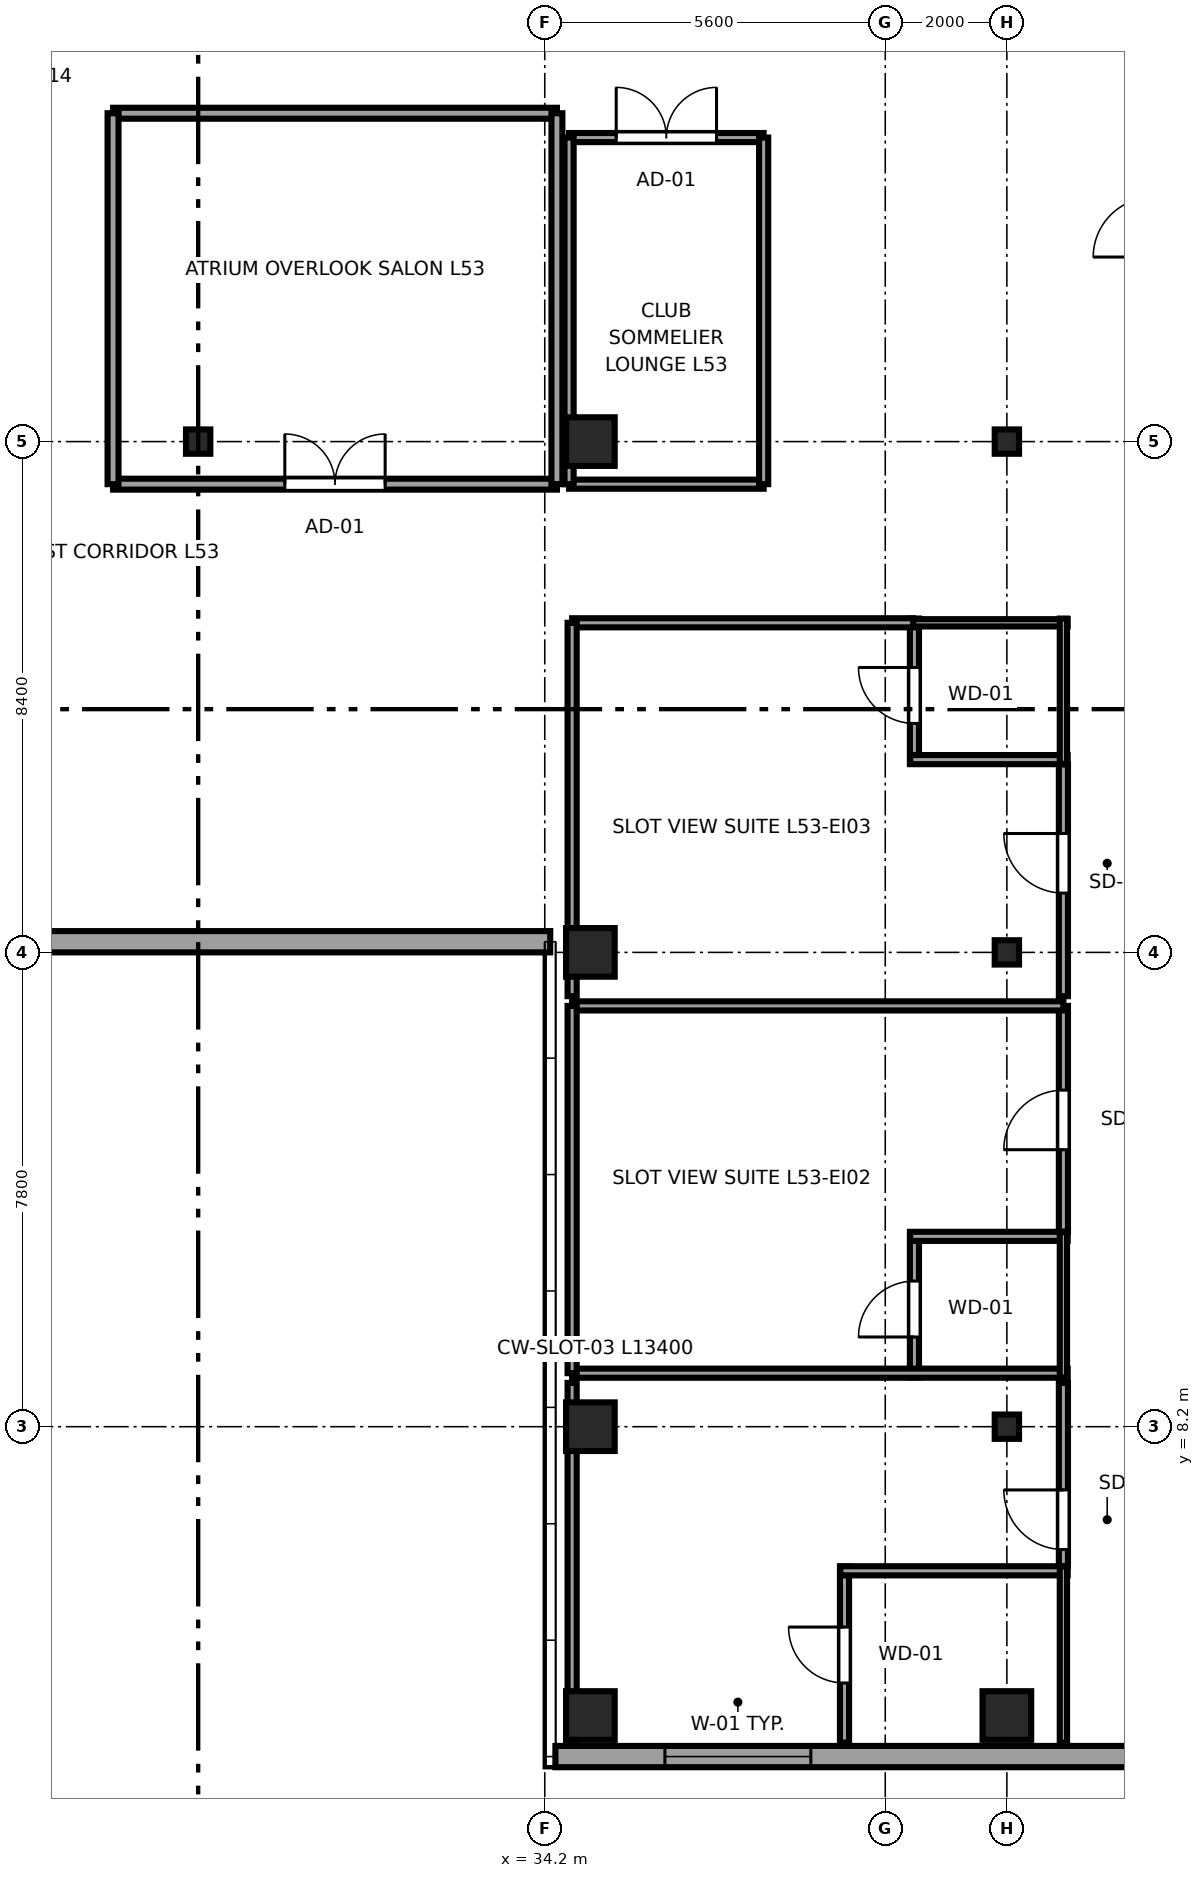
"""IFC4 building model, lengths in metres.
Left out: names, types, materials, properties, quantities, classifications, styles, units other than length and angle.
Written with IfcOpenShell. Run it as: python <this file> out.ifc"""

import sys

from ifc_helpers import new_model, si_unit, direction, frame, frame_2d, origin, origin_2d, place, context, subcontext, project, spatial, rectangle, i_section, extrude, source, transform, mapped, element, fill, save


model = new_model("IFC4")
c1 = context("Model", 3, precision=1e-05, world=origin(), true_north=direction((0.0, 1.0)))
c2 = subcontext(c1, "Body", "Model", "MODEL_VIEW")
j1 = project(units=[si_unit("LENGTHUNIT", "METRE"), si_unit("PLANEANGLEUNIT", "RADIAN")], contexts=[c1])
p1 = place(None, origin())
s1 = spatial("IfcSite", under=j1, at=p1, CompositionType="ELEMENT")
p2 = place(p1, origin())
s2 = spatial("IfcBuilding", under=s1, at=p2, CompositionType="ELEMENT")
p3 = place(p2, frame((0.0, 0.0, 201.75)))
s3 = spatial("IfcBuildingStorey", under=s2, at=p3, CompositionType="ELEMENT", Elevation=201.75)
m1 = source(origin(), c2, "Body", "SweptSolid", [
    extrude(rectangle(XDim=0.8, YDim=0.8, at=origin_2d()), origin(), (0.0, 0.0, 1.0), 3.55),
])
for number, where, z_axis, x_axis in (
    (1, (34.95, 3.45, 0.0), (0.0, 0.0, 1.0), (1.0, 0.0, 0.0)),
    (2, (34.95, 8.2, 0.0), (0.0, 0.0, 1.0), (1.0, 0.0, 0.0)),
    (3, (34.95, 16.0, 0.0), (0.0, 0.0, 1.0), (1.0, 0.0, 0.0)),
    (4, (34.95, 24.4, 0.0), (0.0, 0.0, 1.0), (1.0, 0.0, 0.0)),
    (5, (41.8, 3.45, 0.0), (0.0, 0.0, 1.0), (1.0, 0.0, 0.0)),
):
    element("IfcColumn", number, at=place(p3, frame(where, z_axis=z_axis, x_axis=x_axis)), inside=s3, PredefinedType="COLUMN", context=c2, shape_type="MappedRepresentation", body=[
        mapped(m1, transform((0.0, 0.0, 0.0), x_axis=(1.0, 0.0, 0.0), y_axis=(0.0, 1.0, 0.0), z_axis=(0.0, 0.0, 1.0), scale=1.0)),
    ])
m2 = source(origin(), c2, "Body", "SweptSolid", [
    extrude(i_section(OverallWidth=0.4, OverallDepth=0.4, WebThickness=0.02, FlangeThickness=0.035, at=origin_2d()), origin(), (0.0, 0.0, 1.0), 3.55),
])
for number, where, z_axis, x_axis in (
    (6, (41.8, 8.2, 0.0), (0.0, 0.0, 1.0), (1.0, 0.0, 0.0)),
    (7, (41.8, 16.0, 0.0), (0.0, 0.0, 1.0), (1.0, 0.0, 0.0)),
    (8, (41.8, 24.4, 0.0), (0.0, 0.0, 1.0), (1.0, 0.0, 0.0)),
    (9, (28.5, 24.4, 0.0), (0.0, 0.0, 1.0), (1.0, 0.0, 0.0)),
):
    element("IfcColumn", number, at=place(p3, frame(where, z_axis=z_axis, x_axis=x_axis)), inside=s3, PredefinedType="COLUMN", context=c2, shape_type="MappedRepresentation", body=[
        mapped(m2, transform((0.0, 0.0, 0.0), x_axis=(1.0, 0.0, 0.0), y_axis=(0.0, 1.0, 0.0), z_axis=(0.0, 0.0, 1.0), scale=1.0)),
    ])
p4 = place(p3, frame((22.71, 16.175, 0.0), z_axis=(0.0, 0.0, 1.0), x_axis=(1.0, 0.0, 0.0)))
e10 = element("IfcWall", 10, at=p4, inside=s3, PredefinedType="SOLIDWALL", context=c2, shape_type="SweptSolid", body=[
    extrude(rectangle(XDim=11.58, YDim=0.35, at=frame_2d((5.79, 0.0))), origin(), (0.0, 0.0, 1.0), 2.08),
])
p5 = place(p3, frame((34.375, 2.775, 0.0), z_axis=(0.0, 0.0, 1.0), x_axis=(1.0, 0.0, 0.0)))
e11 = element("IfcWall", 11, at=p5, inside=s3, PredefinedType="SOLIDWALL", context=c2, shape_type="SweptSolid", body=[
    extrude(rectangle(XDim=15.608, YDim=0.35, at=frame_2d((7.804, 0.0))), origin(), (0.0, 0.0, 1.0), 3.29),
])
p6 = place(p5, frame((1.801, 0.0, 0.68)))
e12 = element("IfcOpeningElement", 12, at=p6, cuts=e11, PredefinedType="OPENING", context=c2, shape_type="SweptSolid", body=[
    extrude(rectangle(XDim=2.4, YDim=1.9, at=frame_2d((1.2, 0.95))), frame((0.0, 0.185, 0.0), z_axis=(0.0, -1.0, 0.0), x_axis=(1.0, 0.0, 0.0)), (0.0, 0.0, 1.0), 0.37),
])
p7 = place(p5, frame((11.406, 0.0, 0.68)))
e13 = element("IfcOpeningElement", 13, at=p7, cuts=e11, PredefinedType="OPENING", context=c2, shape_type="SweptSolid", body=[
    extrude(rectangle(XDim=2.4, YDim=1.9, at=frame_2d((1.2, 0.95))), frame((0.0, 0.185, 0.0), z_axis=(0.0, -1.0, 0.0), x_axis=(1.0, 0.0, 0.0)), (0.0, 0.0, 1.0), 0.37),
])
p8 = place(p3, frame((39.13, 3.005, 0.0), z_axis=(0.0, 0.0, 1.0), x_axis=(0.0, 1.0, 0.0)))
e14 = element("IfcWall", 14, at=p8, inside=s3, PredefinedType="PARTITIONING", context=c2, shape_type="SweptSolid", body=[
    extrude(rectangle(XDim=2.895, YDim=0.15, at=frame_2d((1.448, 0.0))), origin(), (0.0, 0.0, 1.0), 3.29),
])
p9 = place(p8, frame((0.98, 0.0, 0.0)))
e15 = element("IfcOpeningElement", 15, at=p9, cuts=e14, PredefinedType="OPENING", context=c2, shape_type="SweptSolid", body=[
    extrude(rectangle(XDim=0.92, YDim=2.01, at=frame_2d((0.46, 1.005))), frame((0.0, 0.085, 0.0), z_axis=(0.0, -1.0, 0.0), x_axis=(1.0, 0.0, 0.0)), (0.0, 0.0, 1.0), 0.17),
])
p10 = place(p3, frame((39.06, 5.83, 0.0), z_axis=(0.0, 0.0, 1.0), x_axis=(1.0, 0.0, 0.0)))
e16 = element("IfcWall", 16, at=p10, inside=s3, PredefinedType="PARTITIONING", context=c2, shape_type="SweptSolid", body=[
    extrude(rectangle(XDim=3.74, YDim=0.15, at=frame_2d((1.87, 0.0))), origin(), (0.0, 0.0, 1.0), 3.29),
])
p11 = place(p3, frame((42.73, 3.005, 0.0), z_axis=(0.0, 0.0, 1.0), x_axis=(0.0, 1.0, 0.0)))
e17 = element("IfcWall", 17, at=p11, inside=s3, PredefinedType="PLUMBINGWALL", context=c2, shape_type="SweptSolid", body=[
    extrude(rectangle(XDim=2.895, YDim=0.12, at=frame_2d((1.448, 0.0))), origin(), (0.0, 0.0, 1.0), 3.29),
])
p12 = place(p3, frame((40.28, 9.01, 0.0), z_axis=(0.0, 0.0, 1.0), x_axis=(0.0, 1.0, 0.0)))
e18 = element("IfcWall", 18, at=p12, inside=s3, PredefinedType="PARTITIONING", context=c2, shape_type="SweptSolid", body=[
    extrude(rectangle(XDim=2.39, YDim=0.15, at=frame_2d((1.195, 0.0))), origin(), (0.0, 0.0, 1.0), 3.29),
])
p13 = place(p12, frame((0.665, 0.0, 0.0)))
e19 = element("IfcOpeningElement", 19, at=p13, cuts=e18, PredefinedType="OPENING", context=c2, shape_type="SweptSolid", body=[
    extrude(rectangle(XDim=0.92, YDim=2.01, at=frame_2d((0.46, 1.005))), frame((0.0, 0.085, 0.0), z_axis=(0.0, -1.0, 0.0), x_axis=(1.0, 0.0, 0.0)), (0.0, 0.0, 1.0), 0.17),
])
p14 = place(p3, frame((34.65, 9.08, 0.0), z_axis=(0.0, 0.0, 1.0), x_axis=(1.0, 0.0, 0.0)))
e20 = element("IfcWall", 20, at=p14, inside=s3, PredefinedType="PARTITIONING", context=c2, shape_type="SweptSolid", body=[
    extrude(rectangle(XDim=8.15, YDim=0.15, at=frame_2d((4.075, 0.0))), origin(), (0.0, 0.0, 1.0), 3.29),
])
p15 = place(p3, frame((40.21, 11.33, 0.0), z_axis=(0.0, 0.0, 1.0), x_axis=(1.0, 0.0, 0.0)))
e21 = element("IfcWall", 21, at=p15, inside=s3, PredefinedType="PARTITIONING", context=c2, shape_type="SweptSolid", body=[
    extrude(rectangle(XDim=2.59, YDim=0.15, at=frame_2d((1.295, 0.0))), origin(), (0.0, 0.0, 1.0), 3.29),
])
p16 = place(p3, frame((42.73, 9.01, 0.0), z_axis=(0.0, 0.0, 1.0), x_axis=(0.0, 1.0, 0.0)))
e22 = element("IfcWall", 22, at=p16, inside=s3, PredefinedType="PLUMBINGWALL", context=c2, shape_type="SweptSolid", body=[
    extrude(rectangle(XDim=2.39, YDim=0.12, at=frame_2d((1.195, 0.0))), origin(), (0.0, 0.0, 1.0), 3.29),
])
p17 = place(p3, frame((40.28, 19.1, 0.0), z_axis=(0.0, 0.0, 1.0), x_axis=(0.0, 1.0, 0.0)))
e23 = element("IfcWall", 23, at=p17, inside=s3, PredefinedType="PARTITIONING", context=c2, shape_type="SweptSolid", body=[
    extrude(rectangle(XDim=2.39, YDim=0.15, at=frame_2d((1.195, 0.0))), origin(), (0.0, 0.0, 1.0), 3.29),
])
p18 = place(p17, frame((0.665, 0.0, 0.0)))
e24 = element("IfcOpeningElement", 24, at=p18, cuts=e23, PredefinedType="OPENING", context=c2, shape_type="SweptSolid", body=[
    extrude(rectangle(XDim=0.92, YDim=2.01, at=frame_2d((0.46, 1.005))), frame((0.0, 0.085, 0.0), z_axis=(0.0, -1.0, 0.0), x_axis=(1.0, 0.0, 0.0)), (0.0, 0.0, 1.0), 0.17),
])
p19 = place(p3, frame((40.21, 19.17, 0.0), z_axis=(0.0, 0.0, 1.0), x_axis=(1.0, 0.0, 0.0)))
e25 = element("IfcWall", 25, at=p19, inside=s3, PredefinedType="PARTITIONING", context=c2, shape_type="SweptSolid", body=[
    extrude(rectangle(XDim=2.59, YDim=0.15, at=frame_2d((1.295, 0.0))), origin(), (0.0, 0.0, 1.0), 3.29),
])
p20 = place(p3, frame((40.21, 21.42, 0.0), z_axis=(0.0, 0.0, 1.0), x_axis=(1.0, 0.0, 0.0)))
e26 = element("IfcWall", 26, at=p20, inside=s3, PredefinedType="PLUMBINGWALL", context=c2, shape_type="SweptSolid", body=[
    extrude(rectangle(XDim=2.59, YDim=0.12, at=frame_2d((1.295, 0.0))), origin(), (0.0, 0.0, 1.0), 3.29),
])
p21 = place(p3, frame((42.73, 19.1, 0.0), z_axis=(0.0, 0.0, 1.0), x_axis=(0.0, 1.0, 0.0)))
e27 = element("IfcWall", 27, at=p21, inside=s3, PredefinedType="PLUMBINGWALL", context=c2, shape_type="SweptSolid", body=[
    extrude(rectangle(XDim=2.39, YDim=0.12, at=frame_2d((1.195, 0.0))), origin(), (0.0, 0.0, 1.0), 3.29),
])
p22 = place(p3, frame((42.73, 5.91, 0.0), z_axis=(0.0, 0.0, 1.0), x_axis=(0.0, 1.0, 0.0)))
e28 = element("IfcWall", 28, at=p22, inside=s3, PredefinedType="PARTITIONING", context=c2, shape_type="SweptSolid", body=[
    extrude(rectangle(XDim=3.01, YDim=0.15, at=frame_2d((1.505, 0.0))), origin(), (0.0, 0.0, 1.0), 3.29),
])
p23 = place(p22, frame((0.27, 0.0, 0.0)))
e29 = element("IfcOpeningElement", 29, at=p23, cuts=e28, PredefinedType="OPENING", context=c2, shape_type="SweptSolid", body=[
    extrude(rectangle(XDim=0.98, YDim=2.12, at=frame_2d((0.49, 1.06))), frame((0.0, 0.085, 0.0), z_axis=(0.0, -1.0, 0.0), x_axis=(1.0, 0.0, 0.0)), (0.0, 0.0, 1.0), 0.17),
])
p24 = place(p3, frame((34.65, 3.005, 0.0), z_axis=(0.0, 0.0, 1.0), x_axis=(0.0, 1.0, 0.0)))
e30 = element("IfcWall", 30, at=p24, inside=s3, PredefinedType="PARTITIONING", context=c2, shape_type="SweptSolid", body=[
    extrude(rectangle(XDim=5.915, YDim=0.15, at=frame_2d((2.958, 0.0))), origin(), (0.0, 0.0, 1.0), 2.08),
])
p25 = place(p3, frame((42.73, 11.41, 0.0), z_axis=(0.0, 0.0, 1.0), x_axis=(0.0, 1.0, 0.0)))
e31 = element("IfcWall", 31, at=p25, inside=s3, PredefinedType="PARTITIONING", context=c2, shape_type="SweptSolid", body=[
    extrude(rectangle(XDim=3.71, YDim=0.15, at=frame_2d((1.855, 0.0))), origin(), (0.0, 0.0, 1.0), 3.29),
])
p26 = place(p25, frame((1.345, 0.0, 0.0)))
e32 = element("IfcOpeningElement", 32, at=p26, cuts=e31, PredefinedType="OPENING", context=c2, shape_type="SweptSolid", body=[
    extrude(rectangle(XDim=0.98, YDim=2.12, at=frame_2d((0.49, 1.06))), frame((0.0, 0.085, 0.0), z_axis=(0.0, -1.0, 0.0), x_axis=(1.0, 0.0, 0.0)), (0.0, 0.0, 1.0), 0.17),
])
p27 = place(p3, frame((34.65, 15.12, 0.0), z_axis=(0.0, 0.0, 1.0), x_axis=(1.0, 0.0, 0.0)))
e33 = element("IfcWall", 33, at=p27, inside=s3, PredefinedType="PARTITIONING", context=c2, shape_type="SweptSolid", body=[
    extrude(rectangle(XDim=8.08, YDim=0.15, at=frame_2d((4.04, 0.0))), origin(), (0.0, 0.0, 1.0), 3.29),
])
p28 = place(p3, frame((34.65, 9.08, 0.0), z_axis=(0.0, 0.0, 1.0), x_axis=(0.0, 1.0, 0.0)))
e34 = element("IfcWall", 34, at=p28, inside=s3, PredefinedType="PARTITIONING", context=c2, shape_type="SweptSolid", body=[
    extrude(rectangle(XDim=6.04, YDim=0.15, at=frame_2d((3.02, 0.0))), origin(), (0.0, 0.0, 1.0), 2.08),
])
p29 = place(p3, frame((42.73, 15.28, 0.0), z_axis=(0.0, 0.0, 1.0), x_axis=(0.0, 1.0, 0.0)))
e35 = element("IfcWall", 35, at=p29, inside=s3, PredefinedType="PARTITIONING", context=c2, shape_type="SweptSolid", body=[
    extrude(rectangle(XDim=3.81, YDim=0.15, at=frame_2d((1.905, 0.0))), origin(), (0.0, 0.0, 1.0), 3.29),
])
p30 = place(p29, frame((1.695, 0.0, 0.0)))
e36 = element("IfcOpeningElement", 36, at=p30, cuts=e35, PredefinedType="OPENING", context=c2, shape_type="SweptSolid", body=[
    extrude(rectangle(XDim=0.98, YDim=2.12, at=frame_2d((0.49, 1.06))), frame((0.0, 0.085, 0.0), z_axis=(0.0, -1.0, 0.0), x_axis=(1.0, 0.0, 0.0)), (0.0, 0.0, 1.0), 0.17),
])
p31 = place(p3, frame((34.65, 21.42, 0.0), z_axis=(0.0, 0.0, 1.0), x_axis=(1.0, 0.0, 0.0)))
e37 = element("IfcWall", 37, at=p31, inside=s3, PredefinedType="PARTITIONING", context=c2, shape_type="SweptSolid", body=[
    extrude(rectangle(XDim=5.61, YDim=0.15, at=frame_2d((2.805, 0.0))), origin(), (0.0, 0.0, 1.0), 3.29),
])
p32 = place(p3, frame((34.65, 15.28, 0.0), z_axis=(0.0, 0.0, 1.0), x_axis=(0.0, 1.0, 0.0)))
e38 = element("IfcWall", 38, at=p32, inside=s3, PredefinedType="PARTITIONING", context=c2, shape_type="SweptSolid", body=[
    extrude(rectangle(XDim=6.14, YDim=0.15, at=frame_2d((3.07, 0.0))), origin(), (0.0, 0.0, 1.0), 2.08),
])
p33 = place(p3, frame((27.1, 23.7, 0.0), z_axis=(0.0, 0.0, 1.0), x_axis=(1.0, 0.0, 0.0)))
e39 = element("IfcWall", 39, at=p33, inside=s3, PredefinedType="PARTITIONING", context=c2, shape_type="SweptSolid", body=[
    extrude(rectangle(XDim=7.3, YDim=0.18, at=frame_2d((3.65, 0.0))), origin(), (0.0, 0.0, 1.0), 3.29),
])
p34 = place(p33, frame((2.825, 0.0, 0.0)))
e40 = element("IfcOpeningElement", 40, at=p34, cuts=e39, PredefinedType="OPENING", context=c2, shape_type="SweptSolid", body=[
    extrude(rectangle(XDim=1.65, YDim=2.15, at=frame_2d((0.825, 1.075))), frame((0.0, 0.1, 0.0), z_axis=(0.0, -1.0, 0.0), x_axis=(1.0, 0.0, 0.0)), (0.0, 0.0, 1.0), 0.2),
])
p35 = place(p3, frame((27.1, 29.8, 0.0), z_axis=(0.0, 0.0, 1.0), x_axis=(1.0, 0.0, 0.0)))
e41 = element("IfcWall", 41, at=p35, inside=s3, PredefinedType="PARTITIONING", context=c2, shape_type="SweptSolid", body=[
    extrude(rectangle(XDim=7.3, YDim=0.18, at=frame_2d((3.65, 0.0))), origin(), (0.0, 0.0, 1.0), 3.29),
])
for number, where, z_axis, x_axis in (
    (42, (27.1, 23.7, 0.0), (0.0, 0.0, 1.0), (0.0, 1.0, 0.0)),
    (43, (34.4, 23.7, 0.0), (0.0, 0.0, 1.0), (0.0, 1.0, 0.0)),
):
    element("IfcWall", number, at=place(p3, frame(where, z_axis=z_axis, x_axis=x_axis)), inside=s3, PredefinedType="PARTITIONING", context=c2, shape_type="SweptSolid", body=[
        extrude(rectangle(XDim=6.1, YDim=0.18, at=frame_2d((3.05, 0.0))), origin(), (0.0, 0.0, 1.0), 3.29),
    ])
p36 = place(p3, frame((34.6, 23.7, 0.0), z_axis=(0.0, 0.0, 1.0), x_axis=(1.0, 0.0, 0.0)))
e44 = element("IfcWall", 44, at=p36, inside=s3, PredefinedType="PARTITIONING", context=c2, shape_type="SweptSolid", body=[
    extrude(rectangle(XDim=3.2, YDim=0.15, at=frame_2d((1.6, 0.0))), origin(), (0.0, 0.0, 1.0), 3.29),
])
p37 = place(p3, frame((34.6, 29.4, 0.0), z_axis=(0.0, 0.0, 1.0), x_axis=(1.0, 0.0, 0.0)))
e45 = element("IfcWall", 45, at=p37, inside=s3, PredefinedType="PARTITIONING", context=c2, shape_type="SweptSolid", body=[
    extrude(rectangle(XDim=3.2, YDim=0.15, at=frame_2d((1.6, 0.0))), origin(), (0.0, 0.0, 1.0), 3.29),
])
p38 = place(p37, frame((0.775, 0.0, 0.0)))
e46 = element("IfcOpeningElement", 46, at=p38, cuts=e45, PredefinedType="OPENING", context=c2, shape_type="SweptSolid", body=[
    extrude(rectangle(XDim=1.65, YDim=2.15, at=frame_2d((0.825, 1.075))), frame((0.0, 0.085, 0.0), z_axis=(0.0, -1.0, 0.0), x_axis=(1.0, 0.0, 0.0)), (0.0, 0.0, 1.0), 0.17),
])
for number, where, z_axis, x_axis in (
    (47, (34.6, 23.7, 0.0), (0.0, 0.0, 1.0), (0.0, 1.0, 0.0)),
    (48, (37.8, 23.7, 0.0), (0.0, 0.0, 1.0), (0.0, 1.0, 0.0)),
):
    element("IfcWall", number, at=place(p3, frame(where, z_axis=z_axis, x_axis=x_axis)), inside=s3, PredefinedType="PARTITIONING", context=c2, shape_type="SweptSolid", body=[
        extrude(rectangle(XDim=5.7, YDim=0.15, at=frame_2d((2.85, 0.0))), origin(), (0.0, 0.0, 1.0), 3.29),
    ])
m3 = source(origin(), c2, "Body", "SweptSolid", [
    extrude(rectangle(XDim=2.4, YDim=1.9, at=frame_2d((1.2, 0.95))), frame((0.0, 0.09, 0.0), z_axis=(0.0, -1.0, 0.0), x_axis=(1.0, 0.0, 0.0)), (0.0, 0.0, 1.0), 0.06),
])
p39 = place(p6, origin())
e49 = element("IfcWindow", 49, at=p39, inside=s3, PartitioningType="TRIPLE_PANEL_HORIZONTAL", PredefinedType="WINDOW", context=c2, shape_type="MappedRepresentation", body=[
    mapped(m3, transform((0.0, 0.0, 0.0), x_axis=(1.0, 0.0, 0.0), y_axis=(0.0, 1.0, 0.0), z_axis=(0.0, 0.0, 1.0), scale=1.0)),
])
fill(e12, e49)
m4 = source(origin(), c2, "Body", "SweptSolid", [
    extrude(rectangle(XDim=0.92, YDim=2.01, at=frame_2d((0.46, 1.005))), frame((0.0, 0.025, 0.0), z_axis=(0.0, -1.0, 0.0), x_axis=(1.0, 0.0, 0.0)), (0.0, 0.0, 1.0), 0.05),
])
p40 = place(p9, origin())
e50 = element("IfcDoor", 50, at=p40, inside=s3, OperationType="SINGLE_SWING_RIGHT", PredefinedType="DOOR", context=c2, shape_type="MappedRepresentation", body=[
    mapped(m4, transform((0.0, 0.0, 0.0), x_axis=(1.0, 0.0, 0.0), y_axis=(0.0, 1.0, 0.0), z_axis=(0.0, 0.0, 1.0), scale=1.0)),
])
fill(e15, e50)
p41 = place(p13, origin())
e51 = element("IfcDoor", 51, at=p41, inside=s3, OperationType="SINGLE_SWING_LEFT", PredefinedType="DOOR", context=c2, shape_type="MappedRepresentation", body=[
    mapped(m4, transform((0.0, 0.0, 0.0), x_axis=(1.0, 0.0, 0.0), y_axis=(0.0, 1.0, 0.0), z_axis=(0.0, 0.0, 1.0), scale=1.0)),
])
fill(e19, e51)
p42 = place(p18, origin())
e52 = element("IfcDoor", 52, at=p42, inside=s3, OperationType="SINGLE_SWING_RIGHT", PredefinedType="DOOR", context=c2, shape_type="MappedRepresentation", body=[
    mapped(m4, transform((0.0, 0.0, 0.0), x_axis=(1.0, 0.0, 0.0), y_axis=(0.0, 1.0, 0.0), z_axis=(0.0, 0.0, 1.0), scale=1.0)),
])
fill(e24, e52)
m5 = source(origin(), c2, "Body", "SweptSolid", [
    extrude(rectangle(XDim=0.98, YDim=2.12, at=frame_2d((0.49, 1.06))), frame((0.0, 0.025, 0.0), z_axis=(0.0, -1.0, 0.0), x_axis=(1.0, 0.0, 0.0)), (0.0, 0.0, 1.0), 0.05),
])
p43 = place(p23, origin())
e53 = element("IfcDoor", 53, at=p43, inside=s3, OperationType="SINGLE_SWING_RIGHT", PredefinedType="DOOR", context=c2, shape_type="MappedRepresentation", body=[
    mapped(m5, transform((0.0, 0.0, 0.0), x_axis=(1.0, 0.0, 0.0), y_axis=(0.0, 1.0, 0.0), z_axis=(0.0, 0.0, 1.0), scale=1.0)),
])
fill(e29, e53)
p44 = place(p26, origin())
e54 = element("IfcDoor", 54, at=p44, inside=s3, OperationType="SINGLE_SWING_LEFT", PredefinedType="DOOR", context=c2, shape_type="MappedRepresentation", body=[
    mapped(m5, transform((0.0, 0.0, 0.0), x_axis=(1.0, 0.0, 0.0), y_axis=(0.0, 1.0, 0.0), z_axis=(0.0, 0.0, 1.0), scale=1.0)),
])
fill(e32, e54)
p45 = place(p30, origin())
e55 = element("IfcDoor", 55, at=p45, inside=s3, OperationType="SINGLE_SWING_RIGHT", PredefinedType="DOOR", context=c2, shape_type="MappedRepresentation", body=[
    mapped(m5, transform((0.0, 0.0, 0.0), x_axis=(1.0, 0.0, 0.0), y_axis=(0.0, 1.0, 0.0), z_axis=(0.0, 0.0, 1.0), scale=1.0)),
])
fill(e36, e55)
m6 = source(origin(), c2, "Body", "SweptSolid", [
    extrude(rectangle(XDim=1.65, YDim=2.15, at=frame_2d((0.825, 1.075))), frame((0.0, 0.025, 0.0), z_axis=(0.0, -1.0, 0.0), x_axis=(1.0, 0.0, 0.0)), (0.0, 0.0, 1.0), 0.05),
])
p46 = place(p34, origin())
e56 = element("IfcDoor", 56, at=p46, inside=s3, OperationType="DOUBLE_DOOR_SINGLE_SWING", PredefinedType="DOOR", context=c2, shape_type="MappedRepresentation", body=[
    mapped(m6, transform((0.0, 0.0, 0.0), x_axis=(1.0, 0.0, 0.0), y_axis=(0.0, 1.0, 0.0), z_axis=(0.0, 0.0, 1.0), scale=1.0)),
])
fill(e40, e56)
p47 = place(p38, origin())
e57 = element("IfcDoor", 57, at=p47, inside=s3, OperationType="DOUBLE_DOOR_SINGLE_SWING", PredefinedType="DOOR", context=c2, shape_type="MappedRepresentation", body=[
    mapped(m6, transform((0.0, 0.0, 0.0), x_axis=(1.0, 0.0, 0.0), y_axis=(0.0, 1.0, 0.0), z_axis=(0.0, 0.0, 1.0), scale=1.0)),
])
fill(e46, e57)
save(model, sys.argv[1])
